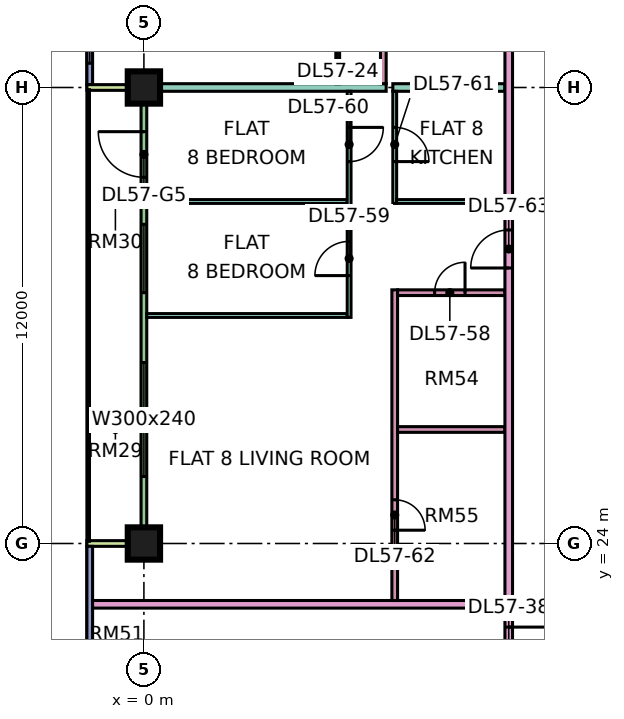
"""IFC4 building model, lengths in metres.
Left out: names, types, materials, properties, quantities, classifications, styles, units other than length and angle.
Written with IfcOpenShell. Run it as: python <this file> out.ifc"""

import sys

from ifc_helpers import new_model, si_unit, direction, frame, frame_2d, origin, origin_2d, place, context, subcontext, project, spatial, rectangle, extrude, element, fill, save


model = new_model("IFC4")
c1 = context("Model", 3, precision=1e-05, world=origin(), true_north=direction((0.0, 1.0)))
c2 = subcontext(c1, "Body", "Model", "MODEL_VIEW")
j1 = project(units=[si_unit("LENGTHUNIT", "METRE"), si_unit("PLANEANGLEUNIT", "RADIAN")], contexts=[c1])
p1 = place(None, origin())
s1 = spatial("IfcSite", under=j1, at=p1, CompositionType="ELEMENT")
p2 = place(p1, origin())
s2 = spatial("IfcBuilding", under=s1, at=p2, CompositionType="ELEMENT")
p3 = place(p2, frame((0.0, 0.0, 241.65)))
s3 = spatial("IfcBuildingStorey", under=s2, at=p3, CompositionType="ELEMENT", Elevation=241.65)
p4 = place(p3, frame((0.0, 24.0, 0.0), z_axis=(0.0, 0.0, 1.0), x_axis=(1.0, 0.0, 0.0)))
e1 = element("IfcColumn", 1, at=p4, inside=s3, PredefinedType="COLUMN", context=c2, shape_type="SweptSolid", body=[
    extrude(rectangle(XDim=0.85, YDim=0.85, at=origin_2d()), origin(), (0.0, 0.0, 1.0), 3.75),
])
p5 = place(p3, frame((0.0, 36.0, 0.0), z_axis=(0.0, 0.0, 1.0), x_axis=(1.0, 0.0, 0.0)))
e2 = element("IfcColumn", 2, at=p5, inside=s3, PredefinedType="COLUMN", context=c2, shape_type="SweptSolid", body=[
    extrude(rectangle(XDim=0.85, YDim=0.85, at=origin_2d()), origin(), (0.0, 0.0, 1.0), 3.75),
])
p6 = place(p3, frame((-1.425, 47.925, 0.0), z_axis=(0.0, 0.0, 1.0), x_axis=(0.0, -1.0, 0.0)))
e3 = element("IfcWall", 3, at=p6, inside=s3, PredefinedType="SOLIDWALL", context=c2, shape_type="SweptSolid", body=[
    extrude(rectangle(XDim=11.85, YDim=0.15, at=frame_2d((5.925, 0.0))), origin(), (0.0, 0.0, 1.0), 3.35),
])
p7 = place(p6, frame((0.562, 0.0, 0.45)))
e4 = element("IfcOpeningElement", 4, at=p7, cuts=e3, PredefinedType="OPENING", context=c2, shape_type="SweptSolid", body=[
    extrude(rectangle(XDim=1.8, YDim=2.4, at=frame_2d((0.9, 1.2))), frame((0.0, 0.085, 0.0), z_axis=(0.0, -1.0, 0.0), x_axis=(1.0, 0.0, 0.0)), (0.0, 0.0, 1.0), 0.17),
])
p8 = place(p6, frame((3.525, 0.0, 0.45)))
e5 = element("IfcOpeningElement", 5, at=p8, cuts=e3, PredefinedType="OPENING", context=c2, shape_type="SweptSolid", body=[
    extrude(rectangle(XDim=4.8, YDim=2.4, at=frame_2d((2.4, 1.2))), frame((0.0, 0.085, 0.0), z_axis=(0.0, -1.0, 0.0), x_axis=(1.0, 0.0, 0.0)), (0.0, 0.0, 1.0), 0.17),
])
p9 = place(p6, frame((9.488, 0.0, 0.45)))
e6 = element("IfcOpeningElement", 6, at=p9, cuts=e3, PredefinedType="OPENING", context=c2, shape_type="SweptSolid", body=[
    extrude(rectangle(XDim=1.8, YDim=2.4, at=frame_2d((0.9, 1.2))), frame((0.0, 0.085, 0.0), z_axis=(0.0, -1.0, 0.0), x_axis=(1.0, 0.0, 0.0)), (0.0, 0.0, 1.0), 0.17),
])
p10 = place(p3, frame((0.0, 35.925, 0.0), z_axis=(0.0, 0.0, 1.0), x_axis=(0.0, -1.0, 0.0)))
e7 = element("IfcWall", 7, at=p10, inside=s3, PredefinedType="SOLIDWALL", context=c2, shape_type="SweptSolid", body=[
    extrude(rectangle(XDim=11.85, YDim=0.15, at=frame_2d((5.925, 0.0))), origin(), (0.0, 0.0, 1.0), 3.35),
])
p11 = place(p10, frame((1.087, 0.0, 0.0)))
e8 = element("IfcOpeningElement", 8, at=p11, cuts=e7, PredefinedType="OPENING", context=c2, shape_type="SweptSolid", body=[
    extrude(rectangle(XDim=1.2, YDim=2.4, at=frame_2d((0.6, 1.2))), frame((0.0, 0.085, 0.0), z_axis=(0.0, -1.0, 0.0), x_axis=(1.0, 0.0, 0.0)), (0.0, 0.0, 1.0), 0.17),
])
p12 = place(p10, frame((3.525, 0.0, 0.45)))
e9 = element("IfcOpeningElement", 9, at=p12, cuts=e7, PredefinedType="OPENING", context=c2, shape_type="SweptSolid", body=[
    extrude(rectangle(XDim=1.8, YDim=2.4, at=frame_2d((0.9, 1.2))), frame((0.0, 0.085, 0.0), z_axis=(0.0, -1.0, 0.0), x_axis=(1.0, 0.0, 0.0)), (0.0, 0.0, 1.0), 0.17),
])
p13 = place(p10, frame((7.163, 0.0, 0.45)))
e10 = element("IfcOpeningElement", 10, at=p13, cuts=e7, PredefinedType="OPENING", context=c2, shape_type="SweptSolid", body=[
    extrude(rectangle(XDim=3.0, YDim=2.4, at=frame_2d((1.5, 1.2))), frame((0.0, 0.085, 0.0), z_axis=(0.0, -1.0, 0.0), x_axis=(1.0, 0.0, 0.0)), (0.0, 0.0, 1.0), 0.17),
])
for number, where, z_axis, x_axis in (
    (11, (-1.5, 36.0, 0.0), (0.0, 0.0, 1.0), (1.0, 0.0, 0.0)),
    (12, (-1.5, 24.0, 0.0), (0.0, 0.0, 1.0), (1.0, 0.0, 0.0)),
):
    element("IfcWall", number, at=place(p3, frame(where, z_axis=z_axis, x_axis=x_axis)), inside=s3, PredefinedType="SOLIDWALL", context=c2, shape_type="SweptSolid", body=[
        extrude(rectangle(XDim=1.5, YDim=0.15, at=frame_2d((0.75, 0.0))), origin(), (0.0, 0.0, 1.0), 3.35),
    ])
p14 = place(p3, frame((-1.425, 23.925, 0.0), z_axis=(0.0, 0.0, 1.0), x_axis=(0.0, -1.0, 0.0)))
e13 = element("IfcWall", 13, at=p14, inside=s3, PredefinedType="SOLIDWALL", context=c2, shape_type="SweptSolid", body=[
    extrude(rectangle(XDim=11.425, YDim=0.15, at=frame_2d((5.712, 0.0))), origin(), (0.0, 0.0, 1.0), 3.35),
])
p15 = place(p14, frame((6.175, 0.0, 0.45)))
e14 = element("IfcOpeningElement", 14, at=p15, cuts=e13, PredefinedType="OPENING", context=c2, shape_type="SweptSolid", body=[
    extrude(rectangle(XDim=3.0, YDim=2.4, at=frame_2d((1.5, 1.2))), frame((0.0, 0.085, 0.0), z_axis=(0.0, -1.0, 0.0), x_axis=(1.0, 0.0, 0.0)), (0.0, 0.0, 1.0), 0.17),
])
p16 = place(p3, frame((-1.35, 22.4, 0.0), z_axis=(0.0, 0.0, 1.0), x_axis=(1.0, 0.0, 0.0)))
e15 = element("IfcWall", 15, at=p16, inside=s3, PredefinedType="PARTITIONING", context=c2, shape_type="SweptSolid", body=[
    extrude(rectangle(XDim=10.85, YDim=0.2, at=frame_2d((5.425, 0.0))), origin(), (0.0, 0.0, 1.0), 3.35),
])
e16 = element("IfcWall", 16, at=p5, inside=s3, PredefinedType="PARTITIONING", context=c2, shape_type="SweptSolid", body=[
    extrude(rectangle(XDim=6.375, YDim=0.2, at=frame_2d((3.188, 0.0))), origin(), (0.0, 0.0, 1.0), 3.35),
])
for number, where, z_axis, x_axis in (
    (17, (0.074, 30.0, 0.0), (0.0, 0.0, 1.0), (1.0, 0.0, 0.0)),
    (18, (0.074, 33.0, 0.0), (0.0, 0.0, 1.0), (1.0, 0.0, 0.0)),
):
    element("IfcWall", number, at=place(p3, frame(where, z_axis=z_axis, x_axis=x_axis)), inside=s3, PredefinedType="PARTITIONING", context=c2, shape_type="SweptSolid", body=[
        extrude(rectangle(XDim=5.276, YDim=0.1, at=frame_2d((2.638, 0.0))), origin(), (0.0, 0.0, 1.0), 3.35),
    ])
p17 = place(p3, frame((5.1, 36.1, 0.0), z_axis=(0.0, 0.0, 1.0), x_axis=(0.0, 1.0, 0.0)))
e19 = element("IfcWall", 19, at=p17, inside=s3, PredefinedType="PARTITIONING", context=c2, shape_type="SweptSolid", body=[
    extrude(rectangle(XDim=2.85, YDim=0.1, at=frame_2d((1.425, 0.0))), origin(), (0.0, 0.0, 1.0), 3.35),
])
p18 = place(p17, frame((0.95, 0.0, 0.0)))
e20 = element("IfcOpeningElement", 20, at=p18, cuts=e19, PredefinedType="OPENING", context=c2, shape_type="SweptSolid", body=[
    extrude(rectangle(XDim=0.9, YDim=2.1, at=frame_2d((0.45, 1.05))), frame((0.0, 0.06, 0.0), z_axis=(0.0, -1.0, 0.0), x_axis=(1.0, 0.0, 0.0)), (0.0, 0.0, 1.0), 0.12),
])
p19 = place(p3, frame((5.4, 29.95, 0.0), z_axis=(0.0, 0.0, 1.0), x_axis=(0.0, 1.0, 0.0)))
e21 = element("IfcWall", 21, at=p19, inside=s3, PredefinedType="PARTITIONING", context=c2, shape_type="SweptSolid", body=[
    extrude(rectangle(XDim=5.95, YDim=0.1, at=frame_2d((2.975, 0.0))), origin(), (0.0, 0.0, 1.0), 3.35),
])
p20 = place(p19, frame((1.1, 0.0, 0.0)))
e22 = element("IfcOpeningElement", 22, at=p20, cuts=e21, PredefinedType="OPENING", context=c2, shape_type="SweptSolid", body=[
    extrude(rectangle(XDim=0.9, YDim=2.1, at=frame_2d((0.45, 1.05))), frame((0.0, 0.06, 0.0), z_axis=(0.0, -1.0, 0.0), x_axis=(1.0, 0.0, 0.0)), (0.0, 0.0, 1.0), 0.12),
])
p21 = place(p19, frame((4.1, 0.0, 0.0)))
e23 = element("IfcOpeningElement", 23, at=p21, cuts=e21, PredefinedType="OPENING", context=c2, shape_type="SweptSolid", body=[
    extrude(rectangle(XDim=0.9, YDim=2.1, at=frame_2d((0.45, 1.05))), frame((0.0, 0.06, 0.0), z_axis=(0.0, -1.0, 0.0), x_axis=(1.0, 0.0, 0.0)), (0.0, 0.0, 1.0), 0.12),
])
p22 = place(p3, frame((6.3, 36.1, 0.0), z_axis=(0.0, 0.0, 1.0), x_axis=(0.0, 1.0, 0.0)))
e24 = element("IfcWall", 24, at=p22, inside=s3, PredefinedType="PARTITIONING", context=c2, shape_type="SweptSolid", body=[
    extrude(rectangle(XDim=11.975, YDim=0.15, at=frame_2d((5.987, 0.0))), origin(), (0.0, 0.0, 1.0), 3.35),
])
p23 = place(p22, frame((6.95, 0.0, 0.0)))
e25 = element("IfcOpeningElement", 25, at=p23, cuts=e24, PredefinedType="OPENING", context=c2, shape_type="SweptSolid", body=[
    extrude(rectangle(XDim=0.8, YDim=2.1, at=frame_2d((0.4, 1.05))), frame((0.0, 0.085, 0.0), z_axis=(0.0, -1.0, 0.0), x_axis=(1.0, 0.0, 0.0)), (0.0, 0.0, 1.0), 0.17),
])
p24 = place(p22, frame((2.15, 0.0, 0.0)))
e26 = element("IfcOpeningElement", 26, at=p24, cuts=e24, PredefinedType="OPENING", context=c2, shape_type="SweptSolid", body=[
    extrude(rectangle(XDim=0.9, YDim=2.1, at=frame_2d((0.45, 1.05))), frame((0.0, 0.085, 0.0), z_axis=(0.0, -1.0, 0.0), x_axis=(1.0, 0.0, 0.0)), (0.0, 0.0, 1.0), 0.17),
])
p25 = place(p22, frame((10.25, 0.0, 0.0)))
e27 = element("IfcOpeningElement", 27, at=p25, cuts=e24, PredefinedType="OPENING", context=c2, shape_type="SweptSolid", body=[
    extrude(rectangle(XDim=0.8, YDim=2.1, at=frame_2d((0.4, 1.05))), frame((0.0, 0.085, 0.0), z_axis=(0.0, -1.0, 0.0), x_axis=(1.0, 0.0, 0.0)), (0.0, 0.0, 1.0), 0.17),
])
p26 = place(p3, frame((6.55, 36.0, 0.0), z_axis=(0.0, 0.0, 1.0), x_axis=(1.0, 0.0, 0.0)))
e28 = element("IfcWall", 28, at=p26, inside=s3, PredefinedType="PARTITIONING", context=c2, shape_type="SweptSolid", body=[
    extrude(rectangle(XDim=2.95, YDim=0.2, at=frame_2d((1.475, 0.0))), origin(), (0.0, 0.0, 1.0), 3.35),
])
p27 = place(p3, frame((6.6, 22.5, 0.0), z_axis=(0.0, 0.0, 1.0), x_axis=(0.0, 1.0, 0.0)))
e29 = element("IfcWall", 29, at=p27, inside=s3, PredefinedType="PARTITIONING", context=c2, shape_type="SweptSolid", body=[
    extrude(rectangle(XDim=8.175, YDim=0.15, at=frame_2d((4.087, 0.0))), origin(), (0.0, 0.0, 1.0), 3.35),
])
p28 = place(p27, frame((1.85, 0.0, 0.0)))
e30 = element("IfcOpeningElement", 30, at=p28, cuts=e29, PredefinedType="OPENING", context=c2, shape_type="SweptSolid", body=[
    extrude(rectangle(XDim=0.8, YDim=2.1, at=frame_2d((0.4, 1.05))), frame((0.0, 0.085, 0.0), z_axis=(0.0, -1.0, 0.0), x_axis=(1.0, 0.0, 0.0)), (0.0, 0.0, 1.0), 0.17),
])
p29 = place(p3, frame((6.6, 32.95, 0.0), z_axis=(0.0, 0.0, 1.0), x_axis=(0.0, 1.0, 0.0)))
e31 = element("IfcWall", 31, at=p29, inside=s3, PredefinedType="PARTITIONING", context=c2, shape_type="SweptSolid", body=[
    extrude(rectangle(XDim=2.95, YDim=0.1, at=frame_2d((1.475, 0.0))), origin(), (0.0, 0.0, 1.0), 3.35),
])
p30 = place(p29, frame((1.1, 0.0, 0.0)))
e32 = element("IfcOpeningElement", 32, at=p30, cuts=e31, PredefinedType="OPENING", context=c2, shape_type="SweptSolid", body=[
    extrude(rectangle(XDim=0.9, YDim=2.1, at=frame_2d((0.45, 1.05))), frame((0.0, 0.06, 0.0), z_axis=(0.0, -1.0, 0.0), x_axis=(1.0, 0.0, 0.0)), (0.0, 0.0, 1.0), 0.12),
])
p31 = place(p3, frame((6.65, 33.0, 0.0), z_axis=(0.0, 0.0, 1.0), x_axis=(1.0, 0.0, 0.0)))
e33 = element("IfcWall", 33, at=p31, inside=s3, PredefinedType="PARTITIONING", context=c2, shape_type="SweptSolid", body=[
    extrude(rectangle(XDim=2.85, YDim=0.1, at=frame_2d((1.425, 0.0))), origin(), (0.0, 0.0, 1.0), 3.35),
])
p32 = place(p3, frame((6.675, 27.0, 0.0), z_axis=(0.0, 0.0, 1.0), x_axis=(1.0, 0.0, 0.0)))
e34 = element("IfcWall", 34, at=p32, inside=s3, PredefinedType="PARTITIONING", context=c2, shape_type="SweptSolid", body=[
    extrude(rectangle(XDim=2.825, YDim=0.15, at=frame_2d((1.413, 0.0))), origin(), (0.0, 0.0, 1.0), 3.35),
])
p33 = place(p3, frame((6.675, 30.6, 0.0), z_axis=(0.0, 0.0, 1.0), x_axis=(1.0, 0.0, 0.0)))
e35 = element("IfcWall", 35, at=p33, inside=s3, PredefinedType="PARTITIONING", context=c2, shape_type="SweptSolid", body=[
    extrude(rectangle(XDim=2.825, YDim=0.15, at=frame_2d((1.413, 0.0))), origin(), (0.0, 0.0, 1.0), 3.35),
])
p34 = place(p33, frame((0.975, 0.0, 0.0)))
e36 = element("IfcOpeningElement", 36, at=p34, cuts=e35, PredefinedType="OPENING", context=c2, shape_type="SweptSolid", body=[
    extrude(rectangle(XDim=0.8, YDim=2.1, at=frame_2d((0.4, 1.05))), frame((0.0, 0.085, 0.0), z_axis=(0.0, -1.0, 0.0), x_axis=(1.0, 0.0, 0.0)), (0.0, 0.0, 1.0), 0.17),
])
p35 = place(p3, frame((9.6, 20.0, 0.0), z_axis=(0.0, 0.0, 1.0), x_axis=(0.0, 1.0, 0.0)))
e37 = element("IfcWall", 37, at=p35, inside=s3, PredefinedType="PARTITIONING", context=c2, shape_type="SweptSolid", body=[
    extrude(rectangle(XDim=42.926, YDim=0.2, at=frame_2d((21.463, 0.0))), origin(), (0.0, 0.0, 1.0), 3.35),
])
p36 = place(p35, frame((28.95, 0.0, 0.0)))
e38 = element("IfcOpeningElement", 38, at=p36, cuts=e37, PredefinedType="OPENING", context=c2, shape_type="SweptSolid", body=[
    extrude(rectangle(XDim=1.0, YDim=2.1, at=frame_2d((0.5, 1.05))), frame((0.0, 0.11, 0.0), z_axis=(0.0, -1.0, 0.0), x_axis=(1.0, 0.0, 0.0)), (0.0, 0.0, 1.0), 0.22),
])
p37 = place(p35, frame((31.95, 0.0, 0.0)))
e39 = element("IfcOpeningElement", 39, at=p37, cuts=e37, PredefinedType="OPENING", context=c2, shape_type="SweptSolid", body=[
    extrude(rectangle(XDim=1.0, YDim=2.1, at=frame_2d((0.5, 1.05))), frame((0.0, 0.11, 0.0), z_axis=(0.0, -1.0, 0.0), x_axis=(1.0, 0.0, 0.0)), (0.0, 0.0, 1.0), 0.22),
])
p38 = place(p35, frame((0.6, 0.0, 0.0)))
e40 = element("IfcOpeningElement", 40, at=p38, cuts=e37, PredefinedType="OPENING", context=c2, shape_type="SweptSolid", body=[
    extrude(rectangle(XDim=1.2, YDim=2.1, at=frame_2d((0.6, 1.05))), frame((0.0, 0.11, 0.0), z_axis=(0.0, -1.0, 0.0), x_axis=(1.0, 0.0, 0.0)), (0.0, 0.0, 1.0), 0.22),
])
p39 = place(p35, frame((11.25, 0.0, 0.0)))
e41 = element("IfcOpeningElement", 41, at=p39, cuts=e37, PredefinedType="OPENING", context=c2, shape_type="SweptSolid", body=[
    extrude(rectangle(XDim=1.0, YDim=2.1, at=frame_2d((0.5, 1.05))), frame((0.0, 0.11, 0.0), z_axis=(0.0, -1.0, 0.0), x_axis=(1.0, 0.0, 0.0)), (0.0, 0.0, 1.0), 0.22),
])
p40 = place(p9, origin())
e42 = element("IfcWindow", 42, at=p40, inside=s3, PartitioningType="SINGLE_PANEL", PredefinedType="WINDOW", context=c2, shape_type="SweptSolid", body=[
    extrude(rectangle(XDim=1.8, YDim=2.4, at=frame_2d((0.9, 1.2))), frame((0.0, 0.03, 0.0), z_axis=(0.0, -1.0, 0.0), x_axis=(1.0, 0.0, 0.0)), (0.0, 0.0, 1.0), 0.06),
])
fill(e6, e42)
p41 = place(p11, frame((1.2, 0.0, 0.0), z_axis=(0.0, 0.0, 1.0), x_axis=(-1.0, 0.0, 0.0)))
e43 = element("IfcDoor", 43, at=p41, inside=s3, OperationType="DOUBLE_DOOR_SINGLE_SWING", PredefinedType="DOOR", context=c2, shape_type="SweptSolid", body=[
    extrude(rectangle(XDim=1.2, YDim=2.4, at=frame_2d((0.6, 1.2))), frame((0.0, 0.025, 0.0), z_axis=(0.0, -1.0, 0.0), x_axis=(1.0, 0.0, 0.0)), (0.0, 0.0, 1.0), 0.05),
])
fill(e8, e43)
p42 = place(p12, origin())
e44 = element("IfcWindow", 44, at=p42, inside=s3, PartitioningType="SINGLE_PANEL", PredefinedType="WINDOW", context=c2, shape_type="SweptSolid", body=[
    extrude(rectangle(XDim=1.8, YDim=2.4, at=frame_2d((0.9, 1.2))), frame((0.0, 0.03, 0.0), z_axis=(0.0, -1.0, 0.0), x_axis=(1.0, 0.0, 0.0)), (0.0, 0.0, 1.0), 0.06),
])
fill(e9, e44)
p43 = place(p13, origin())
e45 = element("IfcWindow", 45, at=p43, inside=s3, PartitioningType="SINGLE_PANEL", PredefinedType="WINDOW", context=c2, shape_type="SweptSolid", body=[
    extrude(rectangle(XDim=3.0, YDim=2.4, at=frame_2d((1.5, 1.2))), frame((0.0, 0.03, 0.0), z_axis=(0.0, -1.0, 0.0), x_axis=(1.0, 0.0, 0.0)), (0.0, 0.0, 1.0), 0.06),
])
fill(e10, e45)
p44 = place(p38, origin())
e46 = element("IfcDoor", 46, at=p44, inside=s3, OperationType="SINGLE_SWING_RIGHT", PredefinedType="DOOR", context=c2, shape_type="SweptSolid", body=[
    extrude(rectangle(XDim=1.2, YDim=2.1, at=frame_2d((0.6, 1.05))), frame((0.0, 0.025, 0.0), z_axis=(0.0, -1.0, 0.0), x_axis=(1.0, 0.0, 0.0)), (0.0, 0.0, 1.0), 0.05),
])
fill(e40, e46)
p45 = place(p34, frame((0.8, 0.0, 0.0), z_axis=(0.0, 0.0, 1.0), x_axis=(-1.0, 0.0, 0.0)))
e47 = element("IfcDoor", 47, at=p45, inside=s3, OperationType="SINGLE_SWING_RIGHT", PredefinedType="DOOR", context=c2, shape_type="SweptSolid", body=[
    extrude(rectangle(XDim=0.8, YDim=2.1, at=frame_2d((0.4, 1.05))), frame((0.0, 0.025, 0.0), z_axis=(0.0, -1.0, 0.0), x_axis=(1.0, 0.0, 0.0)), (0.0, 0.0, 1.0), 0.05),
])
fill(e36, e47)
p46 = place(p20, origin())
e48 = element("IfcDoor", 48, at=p46, inside=s3, OperationType="SINGLE_SWING_LEFT", PredefinedType="DOOR", context=c2, shape_type="SweptSolid", body=[
    extrude(rectangle(XDim=0.9, YDim=2.1, at=frame_2d((0.45, 1.05))), frame((0.0, 0.025, 0.0), z_axis=(0.0, -1.0, 0.0), x_axis=(1.0, 0.0, 0.0)), (0.0, 0.0, 1.0), 0.05),
])
fill(e22, e48)
p47 = place(p21, origin())
e49 = element("IfcDoor", 49, at=p47, inside=s3, OperationType="SINGLE_SWING_RIGHT", PredefinedType="DOOR", context=c2, shape_type="SweptSolid", body=[
    extrude(rectangle(XDim=0.9, YDim=2.1, at=frame_2d((0.45, 1.05))), frame((0.0, 0.025, 0.0), z_axis=(0.0, -1.0, 0.0), x_axis=(1.0, 0.0, 0.0)), (0.0, 0.0, 1.0), 0.05),
])
fill(e23, e49)
p48 = place(p30, frame((0.9, 0.0, 0.0), z_axis=(0.0, 0.0, 1.0), x_axis=(-1.0, 0.0, 0.0)))
e50 = element("IfcDoor", 50, at=p48, inside=s3, OperationType="SINGLE_SWING_LEFT", PredefinedType="DOOR", context=c2, shape_type="SweptSolid", body=[
    extrude(rectangle(XDim=0.9, YDim=2.1, at=frame_2d((0.45, 1.05))), frame((0.0, 0.025, 0.0), z_axis=(0.0, -1.0, 0.0), x_axis=(1.0, 0.0, 0.0)), (0.0, 0.0, 1.0), 0.05),
])
fill(e32, e50)
p49 = place(p28, frame((0.8, 0.0, 0.0), z_axis=(0.0, 0.0, 1.0), x_axis=(-1.0, 0.0, 0.0)))
e51 = element("IfcDoor", 51, at=p49, inside=s3, OperationType="SINGLE_SWING_LEFT", PredefinedType="DOOR", context=c2, shape_type="SweptSolid", body=[
    extrude(rectangle(XDim=0.8, YDim=2.1, at=frame_2d((0.4, 1.05))), frame((0.0, 0.025, 0.0), z_axis=(0.0, -1.0, 0.0), x_axis=(1.0, 0.0, 0.0)), (0.0, 0.0, 1.0), 0.05),
])
fill(e30, e51)
p50 = place(p39, origin())
e52 = element("IfcDoor", 52, at=p50, inside=s3, OperationType="SINGLE_SWING_LEFT", PredefinedType="DOOR", context=c2, shape_type="SweptSolid", body=[
    extrude(rectangle(XDim=1.0, YDim=2.1, at=frame_2d((0.5, 1.05))), frame((0.0, 0.025, 0.0), z_axis=(0.0, -1.0, 0.0), x_axis=(1.0, 0.0, 0.0)), (0.0, 0.0, 1.0), 0.05),
])
fill(e41, e52)
save(model, sys.argv[1])
